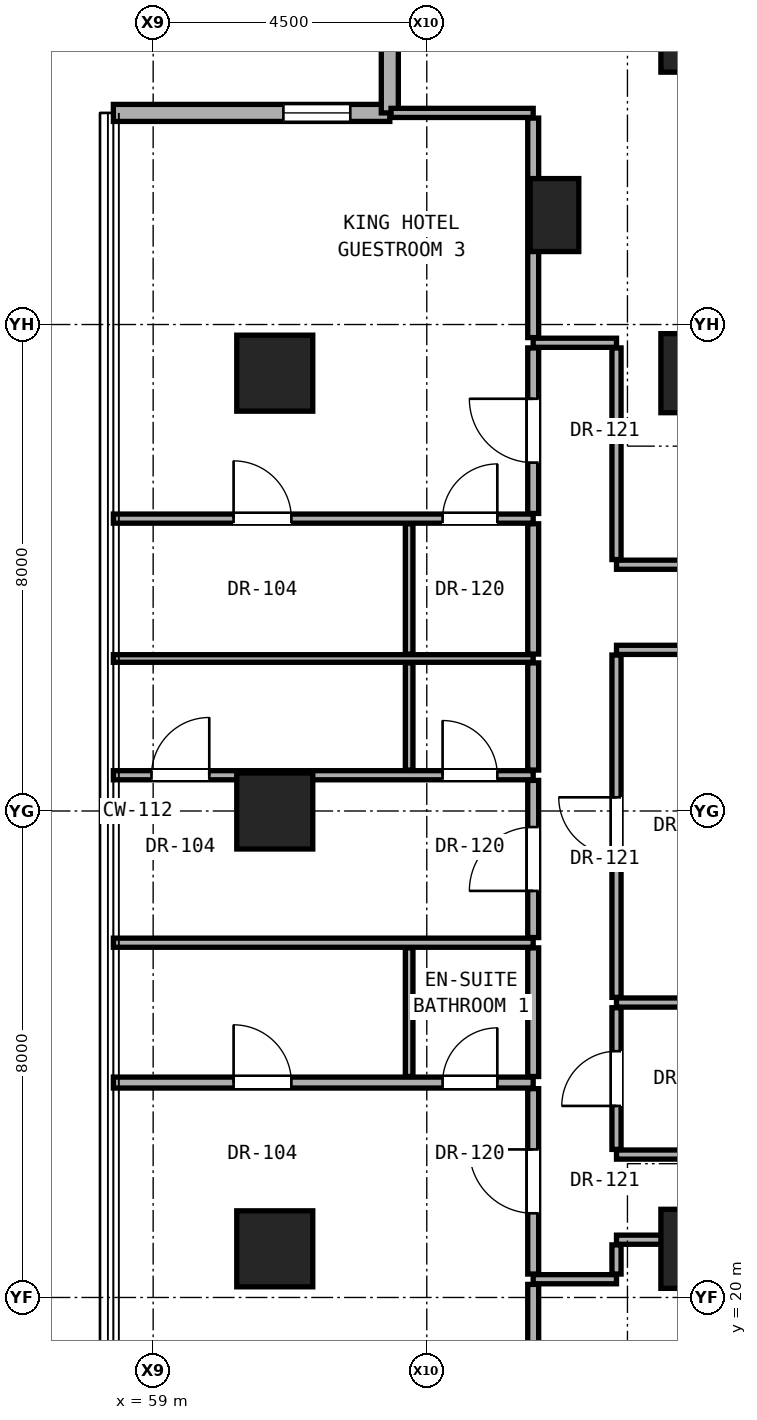
"""IFC4 building model, lengths in metres.
Left out: names, types, materials, properties, quantities, classifications, styles, units other than length and angle.
Written with IfcOpenShell. Run it as: python <this file> out.ifc"""

import sys

from ifc_helpers import new_model, si_unit, direction, frame, frame_2d, origin, origin_2d, place, context, subcontext, project, spatial, rectangle, hollow_rectangle, extrude, element, fill, save


model = new_model("IFC4")
c1 = context("Model", 3, precision=1e-05, world=origin(), true_north=direction((0.0, 1.0)))
c2 = subcontext(c1, "Body", "Model", "MODEL_VIEW")
j1 = project(units=[si_unit("LENGTHUNIT", "METRE"), si_unit("PLANEANGLEUNIT", "RADIAN")], contexts=[c1])
p1 = place(None, origin())
s1 = spatial("IfcSite", under=j1, at=p1, CompositionType="ELEMENT")
p2 = place(p1, origin())
s2 = spatial("IfcBuilding", under=s1, at=p2, CompositionType="ELEMENT")
p3 = place(p2, frame((0.0, 0.0, 62.0)))
s3 = spatial("IfcBuildingStorey", under=s2, at=p3, CompositionType="ELEMENT", Elevation=62.0)
for number, where, z_axis, x_axis in (
    (1, (68.0, 20.8, 0.0), (0.0, 0.0, 1.0), (1.0, 0.0, 0.0)),
    (2, (68.0, 35.2, 0.0), (0.0, 0.0, 1.0), (1.0, 0.0, 0.0)),
    (3, (68.0, 40.8, 0.0), (0.0, 0.0, 1.0), (1.0, 0.0, 0.0)),
):
    element("IfcColumn", number, at=place(p3, frame(where, z_axis=z_axis, x_axis=x_axis)), inside=s3, PredefinedType="COLUMN", context=c2, shape_type="SweptSolid", body=[
        extrude(rectangle(XDim=1.3, YDim=1.3, at=origin_2d()), origin(), (0.0, 0.0, 1.0), 3.3),
    ])
for number, where, z_axis, x_axis in (
    (4, (61.0, 20.8, 0.0), (0.0, 0.0, 1.0), (1.0, 0.0, 0.0)),
    (5, (61.0, 28.0, 0.0), (0.0, 0.0, 1.0), (1.0, 0.0, 0.0)),
    (6, (61.0, 35.2, 0.0), (0.0, 0.0, 1.0), (1.0, 0.0, 0.0)),
):
    element("IfcColumn", number, at=place(p3, frame(where, z_axis=z_axis, x_axis=x_axis)), inside=s3, PredefinedType="COLUMN", context=c2, shape_type="SweptSolid", body=[
        extrude(hollow_rectangle(XDim=1.25, YDim=1.25, WallThickness=0.07, at=origin_2d()), origin(), (0.0, 0.0, 1.0), 3.3),
    ])
p4 = place(p3, frame((65.6, 37.8, 0.0), z_axis=(0.0, 0.0, 1.0), x_axis=(1.0, 0.0, 0.0)))
e7 = element("IfcColumn", 7, at=p4, inside=s3, PredefinedType="PILASTER", context=c2, shape_type="SweptSolid", body=[
    extrude(rectangle(XDim=0.8, YDim=1.2, at=origin_2d()), origin(), (0.0, 0.0, 1.0), 3.3),
])
p5 = place(p3, frame((62.892, 39.48, 0.0), z_axis=(0.0, 0.0, 1.0), x_axis=(-1.0, 0.0, 0.0)))
e8 = element("IfcWall", 8, at=p5, inside=s3, PredefinedType="SOLIDWALL", context=c2, shape_type="SweptSolid", body=[
    extrude(rectangle(XDim=4.546, YDim=0.28, at=frame_2d((2.273, 0.0))), origin(), (0.0, 0.0, 1.0), 3.04),
])
p6 = place(p5, frame((0.65, 0.0, 0.85)))
e9 = element("IfcOpeningElement", 9, at=p6, cuts=e8, PredefinedType="OPENING", context=c2, shape_type="SweptSolid", body=[
    extrude(rectangle(XDim=1.1, YDim=2.0, at=frame_2d((0.55, 1.0))), frame((0.0, 0.15, 0.0), z_axis=(0.0, -1.0, 0.0), x_axis=(1.0, 0.0, 0.0)), (0.0, 0.0, 1.0), 0.3),
])
p7 = place(p3, frame((62.892, 44.026, 0.0), z_axis=(0.0, 0.0, 1.0), x_axis=(0.0, -1.0, 0.0)))
e10 = element("IfcWall", 10, at=p7, inside=s3, PredefinedType="SOLIDWALL", context=c2, shape_type="SweptSolid", body=[
    extrude(rectangle(XDim=4.546, YDim=0.28, at=frame_2d((2.273, 0.0))), origin(), (0.0, 0.0, 1.0), 3.04),
])
p8 = place(p3, frame((65.25, 20.3, 0.0), z_axis=(0.0, 0.0, 1.0), x_axis=(1.0, 0.0, 0.0)))
e11 = element("IfcWall", 11, at=p8, inside=s3, PredefinedType="PARTITIONING", context=c2, shape_type="SweptSolid", body=[
    extrude(rectangle(XDim=1.37, YDim=0.15, at=frame_2d((0.685, 0.0))), origin(), (0.0, 0.0, 1.0), 3.06),
])
p9 = place(p3, frame((66.62, 20.95, 0.0), z_axis=(0.0, 0.0, 1.0), x_axis=(1.0, 0.0, 0.0)))
e12 = element("IfcWall", 12, at=p9, inside=s3, PredefinedType="PARTITIONING", context=c2, shape_type="SweptSolid", body=[
    extrude(rectangle(XDim=1.06, YDim=0.15, at=frame_2d((0.53, 0.0))), origin(), (0.0, 0.0, 1.0), 2.452),
])
p10 = place(p3, frame((66.62, 22.35, 0.0), z_axis=(0.0, 0.0, 1.0), x_axis=(1.0, 0.0, 0.0)))
e13 = element("IfcWall", 13, at=p10, inside=s3, PredefinedType="PARTITIONING", context=c2, shape_type="SweptSolid", body=[
    extrude(rectangle(XDim=19.63, YDim=0.15, at=frame_2d((9.815, 0.0))), origin(), (0.0, 0.0, 1.0), 2.125),
])
p11 = place(p10, frame((12.085, 0.0, 0.0)))
e14 = element("IfcOpeningElement", 14, at=p11, cuts=e13, PredefinedType="OPENING", context=c2, shape_type="SweptSolid", body=[
    extrude(rectangle(XDim=0.85, YDim=2.01, at=frame_2d((0.425, 1.005))), frame((0.0, 0.085, 0.0), z_axis=(0.0, -1.0, 0.0), x_axis=(1.0, 0.0, 0.0)), (0.0, 0.0, 1.0), 0.17),
])
p12 = place(p3, frame((58.346, 23.534, 0.0), z_axis=(0.0, 0.0, 1.0), x_axis=(1.0, 0.0, 0.0)))
e15 = element("IfcWall", 15, at=p12, inside=s3, PredefinedType="PARTITIONING", context=c2, shape_type="SweptSolid", body=[
    extrude(rectangle(XDim=6.904, YDim=0.18, at=frame_2d((3.452, 0.0))), origin(), (0.0, 0.0, 1.0), 2.196),
])
p13 = place(p12, frame((1.977, 0.0, 0.0)))
e16 = element("IfcOpeningElement", 16, at=p13, cuts=e15, PredefinedType="OPENING", context=c2, shape_type="SweptSolid", body=[
    extrude(rectangle(XDim=0.95, YDim=2.15, at=frame_2d((0.475, 1.075))), frame((0.0, 0.1, 0.0), z_axis=(0.0, -1.0, 0.0), x_axis=(1.0, 0.0, 0.0)), (0.0, 0.0, 1.0), 0.2),
])
p14 = place(p12, frame((5.414, 0.0, 0.0)))
e17 = element("IfcOpeningElement", 17, at=p14, cuts=e15, PredefinedType="OPENING", context=c2, shape_type="SweptSolid", body=[
    extrude(rectangle(XDim=0.9, YDim=2.1, at=frame_2d((0.45, 1.05))), frame((0.0, 0.1, 0.0), z_axis=(0.0, -1.0, 0.0), x_axis=(1.0, 0.0, 0.0)), (0.0, 0.0, 1.0), 0.2),
])
p15 = place(p3, frame((66.62, 24.85, 0.0), z_axis=(0.0, 0.0, 1.0), x_axis=(1.0, 0.0, 0.0)))
e18 = element("IfcWall", 18, at=p15, inside=s3, PredefinedType="PARTITIONING", context=c2, shape_type="SweptSolid", body=[
    extrude(rectangle(XDim=3.13, YDim=0.15, at=frame_2d((1.565, 0.0))), origin(), (0.0, 0.0, 1.0), 2.125),
])
p16 = place(p3, frame((58.346, 25.834, 0.0), z_axis=(0.0, 0.0, 1.0), x_axis=(1.0, 0.0, 0.0)))
e19 = element("IfcWall", 19, at=p16, inside=s3, PredefinedType="PARTITIONING", context=c2, shape_type="SweptSolid", body=[
    extrude(rectangle(XDim=6.904, YDim=0.15, at=frame_2d((3.452, 0.0))), origin(), (0.0, 0.0, 1.0), 2.196),
])
p17 = place(p3, frame((58.346, 28.588, 0.0), z_axis=(0.0, 0.0, 1.0), x_axis=(1.0, 0.0, 0.0)))
e20 = element("IfcWall", 20, at=p17, inside=s3, PredefinedType="PARTITIONING", context=c2, shape_type="SweptSolid", body=[
    extrude(rectangle(XDim=6.904, YDim=0.15, at=frame_2d((3.452, 0.0))), origin(), (0.0, 0.0, 1.0), 2.196),
])
p18 = place(p17, frame((0.627, 0.0, 0.0)))
e21 = element("IfcOpeningElement", 21, at=p18, cuts=e20, PredefinedType="OPENING", context=c2, shape_type="SweptSolid", body=[
    extrude(rectangle(XDim=0.95, YDim=2.15, at=frame_2d((0.475, 1.075))), frame((0.0, 0.085, 0.0), z_axis=(0.0, -1.0, 0.0), x_axis=(1.0, 0.0, 0.0)), (0.0, 0.0, 1.0), 0.17),
])
p19 = place(p17, frame((5.414, 0.0, 0.0)))
e22 = element("IfcOpeningElement", 22, at=p19, cuts=e20, PredefinedType="OPENING", context=c2, shape_type="SweptSolid", body=[
    extrude(rectangle(XDim=0.9, YDim=2.1, at=frame_2d((0.45, 1.05))), frame((0.0, 0.085, 0.0), z_axis=(0.0, -1.0, 0.0), x_axis=(1.0, 0.0, 0.0)), (0.0, 0.0, 1.0), 0.17),
])
p20 = place(p3, frame((58.346, 30.508, 0.0), z_axis=(0.0, 0.0, 1.0), x_axis=(1.0, 0.0, 0.0)))
e23 = element("IfcWall", 23, at=p20, inside=s3, PredefinedType="PARTITIONING", context=c2, shape_type="SweptSolid", body=[
    extrude(rectangle(XDim=6.904, YDim=0.125, at=frame_2d((3.452, 0.0))), origin(), (0.0, 0.0, 1.0), 2.196),
])
p21 = place(p3, frame((66.62, 30.65, 0.0), z_axis=(0.0, 0.0, 1.0), x_axis=(1.0, 0.0, 0.0)))
e24 = element("IfcWall", 24, at=p21, inside=s3, PredefinedType="PARTITIONING", context=c2, shape_type="SweptSolid", body=[
    extrude(rectangle(XDim=19.63, YDim=0.15, at=frame_2d((9.815, 0.0))), origin(), (0.0, 0.0, 1.0), 2.125),
])
p22 = place(p21, frame((3.855, 0.0, 0.0)))
e25 = element("IfcOpeningElement", 25, at=p22, cuts=e24, PredefinedType="OPENING", context=c2, shape_type="SweptSolid", body=[
    extrude(rectangle(XDim=0.85, YDim=2.01, at=frame_2d((0.425, 1.005))), frame((0.0, 0.085, 0.0), z_axis=(0.0, -1.0, 0.0), x_axis=(1.0, 0.0, 0.0)), (0.0, 0.0, 1.0), 0.17),
])
p23 = place(p21, frame((12.085, 0.0, 0.0)))
e26 = element("IfcOpeningElement", 26, at=p23, cuts=e24, PredefinedType="OPENING", context=c2, shape_type="SweptSolid", body=[
    extrude(rectangle(XDim=0.85, YDim=2.01, at=frame_2d((0.425, 1.005))), frame((0.0, 0.085, 0.0), z_axis=(0.0, -1.0, 0.0), x_axis=(1.0, 0.0, 0.0)), (0.0, 0.0, 1.0), 0.17),
])
p24 = place(p3, frame((66.62, 32.05, 0.0), z_axis=(0.0, 0.0, 1.0), x_axis=(1.0, 0.0, 0.0)))
e27 = element("IfcWall", 27, at=p24, inside=s3, PredefinedType="PARTITIONING", context=c2, shape_type="SweptSolid", body=[
    extrude(rectangle(XDim=2.18, YDim=0.15, at=frame_2d((1.09, 0.0))), origin(), (0.0, 0.0, 1.0), 2.125),
])
p25 = place(p3, frame((58.346, 32.808, 0.0), z_axis=(0.0, 0.0, 1.0), x_axis=(1.0, 0.0, 0.0)))
e28 = element("IfcWall", 28, at=p25, inside=s3, PredefinedType="PARTITIONING", context=c2, shape_type="SweptSolid", body=[
    extrude(rectangle(XDim=6.904, YDim=0.15, at=frame_2d((3.452, 0.0))), origin(), (0.0, 0.0, 1.0), 2.196),
])
p26 = place(p25, frame((1.977, 0.0, 0.0)))
e29 = element("IfcOpeningElement", 29, at=p26, cuts=e28, PredefinedType="OPENING", context=c2, shape_type="SweptSolid", body=[
    extrude(rectangle(XDim=0.95, YDim=2.15, at=frame_2d((0.475, 1.075))), frame((0.0, 0.085, 0.0), z_axis=(0.0, -1.0, 0.0), x_axis=(1.0, 0.0, 0.0)), (0.0, 0.0, 1.0), 0.17),
])
p27 = place(p25, frame((5.414, 0.0, 0.0)))
e30 = element("IfcOpeningElement", 30, at=p27, cuts=e28, PredefinedType="OPENING", context=c2, shape_type="SweptSolid", body=[
    extrude(rectangle(XDim=0.9, YDim=2.1, at=frame_2d((0.45, 1.05))), frame((0.0, 0.085, 0.0), z_axis=(0.0, -1.0, 0.0), x_axis=(1.0, 0.0, 0.0)), (0.0, 0.0, 1.0), 0.17),
])
p28 = place(p3, frame((65.25, 35.7, 0.0), z_axis=(0.0, 0.0, 1.0), x_axis=(1.0, 0.0, 0.0)))
e31 = element("IfcWall", 31, at=p28, inside=s3, PredefinedType="PARTITIONING", context=c2, shape_type="SweptSolid", body=[
    extrude(rectangle(XDim=1.37, YDim=0.15, at=frame_2d((0.685, 0.0))), origin(), (0.0, 0.0, 1.0), 3.06),
])
p29 = place(p3, frame((62.912, 39.48, 0.0), z_axis=(0.0, 0.0, 1.0), x_axis=(1.0, 0.0, 0.0)))
e32 = element("IfcWall", 32, at=p29, inside=s3, PredefinedType="PARTITIONING", context=c2, shape_type="SweptSolid", body=[
    extrude(rectangle(XDim=2.338, YDim=0.15, at=frame_2d((1.169, 0.0))), origin(), (0.0, 0.0, 1.0), 3.06),
])
p30 = place(p3, frame((63.21, 23.634, 0.0), z_axis=(0.0, 0.0, 1.0), x_axis=(0.0, 1.0, 0.0)))
e33 = element("IfcWall", 33, at=p30, inside=s3, PredefinedType="PARTITIONING", context=c2, shape_type="SweptSolid", body=[
    extrude(rectangle(XDim=2.115, YDim=0.125, at=frame_2d((1.058, 0.0))), origin(), (0.0, 0.0, 1.0), 3.06),
])
p31 = place(p3, frame((63.21, 28.673, 0.0), z_axis=(0.0, 0.0, 1.0), x_axis=(0.0, 1.0, 0.0)))
e34 = element("IfcWall", 34, at=p31, inside=s3, PredefinedType="PARTITIONING", context=c2, shape_type="SweptSolid", body=[
    extrude(rectangle(XDim=1.762, YDim=0.125, at=frame_2d((0.881, 0.0))), origin(), (0.0, 0.0, 1.0), 3.06),
])
p32 = place(p3, frame((63.21, 30.581, 0.0), z_axis=(0.0, 0.0, 1.0), x_axis=(0.0, 1.0, 0.0)))
e35 = element("IfcWall", 35, at=p32, inside=s3, PredefinedType="PARTITIONING", context=c2, shape_type="SweptSolid", body=[
    extrude(rectangle(XDim=2.142, YDim=0.125, at=frame_2d((1.071, 0.0))), origin(), (0.0, 0.0, 1.0), 3.06),
])
p33 = place(p3, frame((65.25, 16.62, 0.0), z_axis=(0.0, 0.0, 1.0), x_axis=(0.0, 1.0, 0.0)))
e36 = element("IfcWall", 36, at=p33, inside=s3, PredefinedType="PARTITIONING", context=c2, shape_type="SweptSolid", body=[
    extrude(rectangle(XDim=3.595, YDim=0.18, at=frame_2d((1.797, 0.0))), origin(), (0.0, 0.0, 1.0), 2.436),
])
p34 = place(p3, frame((65.25, 20.385, 0.0), z_axis=(0.0, 0.0, 1.0), x_axis=(0.0, 1.0, 0.0)))
e37 = element("IfcWall", 37, at=p34, inside=s3, PredefinedType="PARTITIONING", context=c2, shape_type="SweptSolid", body=[
    extrude(rectangle(XDim=3.049, YDim=0.18, at=frame_2d((1.524, 0.0))), origin(), (0.0, 0.0, 1.0), 2.452),
])
p35 = place(p34, frame((1.0, 0.0, 0.0)))
e38 = element("IfcOpeningElement", 38, at=p35, cuts=e37, PredefinedType="OPENING", context=c2, shape_type="SweptSolid", body=[
    extrude(rectangle(XDim=1.05, YDim=2.2, at=frame_2d((0.525, 1.1))), frame((0.0, 0.1, 0.0), z_axis=(0.0, -1.0, 0.0), x_axis=(1.0, 0.0, 0.0)), (0.0, 0.0, 1.0), 0.2),
])
p36 = place(p3, frame((65.25, 23.634, 0.0), z_axis=(0.0, 0.0, 1.0), x_axis=(0.0, 1.0, 0.0)))
e39 = element("IfcWall", 39, at=p36, inside=s3, PredefinedType="PARTITIONING", context=c2, shape_type="SweptSolid", body=[
    extrude(rectangle(XDim=2.115, YDim=0.18, at=frame_2d((1.058, 0.0))), origin(), (0.0, 0.0, 1.0), 3.06),
])
p37 = place(p3, frame((65.25, 25.919, 0.0), z_axis=(0.0, 0.0, 1.0), x_axis=(0.0, 1.0, 0.0)))
e40 = element("IfcWall", 40, at=p37, inside=s3, PredefinedType="PARTITIONING", context=c2, shape_type="SweptSolid", body=[
    extrude(rectangle(XDim=2.584, YDim=0.18, at=frame_2d((1.292, 0.0))), origin(), (0.0, 0.0, 1.0), 2.279),
])
p38 = place(p37, frame((0.767, 0.0, 0.0)))
e41 = element("IfcOpeningElement", 41, at=p38, cuts=e40, PredefinedType="OPENING", context=c2, shape_type="SweptSolid", body=[
    extrude(rectangle(XDim=1.05, YDim=2.2, at=frame_2d((0.525, 1.1))), frame((0.0, 0.1, 0.0), z_axis=(0.0, -1.0, 0.0), x_axis=(1.0, 0.0, 0.0)), (0.0, 0.0, 1.0), 0.2),
])
p39 = place(p3, frame((65.25, 28.673, 0.0), z_axis=(0.0, 0.0, 1.0), x_axis=(0.0, 1.0, 0.0)))
e42 = element("IfcWall", 42, at=p39, inside=s3, PredefinedType="PARTITIONING", context=c2, shape_type="SweptSolid", body=[
    extrude(rectangle(XDim=1.762, YDim=0.18, at=frame_2d((0.881, 0.0))), origin(), (0.0, 0.0, 1.0), 3.06),
])
p40 = place(p3, frame((65.25, 30.581, 0.0), z_axis=(0.0, 0.0, 1.0), x_axis=(0.0, 1.0, 0.0)))
e43 = element("IfcWall", 43, at=p40, inside=s3, PredefinedType="PARTITIONING", context=c2, shape_type="SweptSolid", body=[
    extrude(rectangle(XDim=2.142, YDim=0.18, at=frame_2d((1.071, 0.0))), origin(), (0.0, 0.0, 1.0), 3.06),
])
p41 = place(p3, frame((65.25, 32.893, 0.0), z_axis=(0.0, 0.0, 1.0), x_axis=(0.0, 1.0, 0.0)))
e44 = element("IfcWall", 44, at=p41, inside=s3, PredefinedType="PARTITIONING", context=c2, shape_type="SweptSolid", body=[
    extrude(rectangle(XDim=2.722, YDim=0.18, at=frame_2d((1.361, 0.0))), origin(), (0.0, 0.0, 1.0), 2.452),
])
p42 = place(p41, frame((0.836, 0.0, 0.0)))
e45 = element("IfcOpeningElement", 45, at=p42, cuts=e44, PredefinedType="OPENING", context=c2, shape_type="SweptSolid", body=[
    extrude(rectangle(XDim=1.05, YDim=2.2, at=frame_2d((0.525, 1.1))), frame((0.0, 0.1, 0.0), z_axis=(0.0, -1.0, 0.0), x_axis=(1.0, 0.0, 0.0)), (0.0, 0.0, 1.0), 0.2),
])
p43 = place(p3, frame((65.25, 35.785, 0.0), z_axis=(0.0, 0.0, 1.0), x_axis=(0.0, 1.0, 0.0)))
e46 = element("IfcWall", 46, at=p43, inside=s3, PredefinedType="PARTITIONING", context=c2, shape_type="SweptSolid", body=[
    extrude(rectangle(XDim=3.61, YDim=0.18, at=frame_2d((1.805, 0.0))), origin(), (0.0, 0.0, 1.0), 2.436),
])
p44 = place(p3, frame((66.62, 20.385, 0.0), z_axis=(0.0, 0.0, 1.0), x_axis=(0.0, 1.0, 0.0)))
e47 = element("IfcWall", 47, at=p44, inside=s3, PredefinedType="PARTITIONING", context=c2, shape_type="SweptSolid", body=[
    extrude(rectangle(XDim=0.48, YDim=0.15, at=frame_2d((0.24, 0.0))), origin(), (0.0, 0.0, 1.0), 2.452),
])
p45 = place(p3, frame((66.62, 22.435, 0.0), z_axis=(0.0, 0.0, 1.0), x_axis=(0.0, 1.0, 0.0)))
e48 = element("IfcWall", 48, at=p45, inside=s3, PredefinedType="PARTITIONING", context=c2, shape_type="SweptSolid", body=[
    extrude(rectangle(XDim=2.33, YDim=0.15, at=frame_2d((1.165, 0.0))), origin(), (0.0, 0.0, 1.0), 3.06),
])
p46 = place(p45, frame((0.715, 0.0, 0.0)))
e49 = element("IfcOpeningElement", 49, at=p46, cuts=e48, PredefinedType="OPENING", context=c2, shape_type="SweptSolid", body=[
    extrude(rectangle(XDim=0.9, YDim=2.1, at=frame_2d((0.45, 1.05))), frame((0.0, 0.085, 0.0), z_axis=(0.0, -1.0, 0.0), x_axis=(1.0, 0.0, 0.0)), (0.0, 0.0, 1.0), 0.17),
])
p47 = place(p3, frame((66.62, 24.935, 0.0), z_axis=(0.0, 0.0, 1.0), x_axis=(0.0, 1.0, 0.0)))
e50 = element("IfcWall", 50, at=p47, inside=s3, PredefinedType="PARTITIONING", context=c2, shape_type="SweptSolid", body=[
    extrude(rectangle(XDim=5.63, YDim=0.15, at=frame_2d((2.815, 0.0))), origin(), (0.0, 0.0, 1.0), 2.279),
])
p48 = place(p47, frame((2.34, 0.0, 0.0)))
e51 = element("IfcOpeningElement", 51, at=p48, cuts=e50, PredefinedType="OPENING", context=c2, shape_type="SweptSolid", body=[
    extrude(rectangle(XDim=0.95, YDim=2.15, at=frame_2d((0.475, 1.075))), frame((0.0, 0.085, 0.0), z_axis=(0.0, -1.0, 0.0), x_axis=(1.0, 0.0, 0.0)), (0.0, 0.0, 1.0), 0.17),
])
p49 = place(p3, frame((66.62, 32.135, 0.0), z_axis=(0.0, 0.0, 1.0), x_axis=(0.0, 1.0, 0.0)))
e52 = element("IfcWall", 52, at=p49, inside=s3, PredefinedType="PARTITIONING", context=c2, shape_type="SweptSolid", body=[
    extrude(rectangle(XDim=3.48, YDim=0.15, at=frame_2d((1.74, 0.0))), origin(), (0.0, 0.0, 1.0), 2.452),
])
p50 = place(p6, origin())
e53 = element("IfcWindow", 53, at=p50, inside=s3, PartitioningType="SINGLE_PANEL", PredefinedType="WINDOW", context=c2, shape_type="SweptSolid", body=[
    extrude(rectangle(XDim=1.1, YDim=2.0, at=frame_2d((0.55, 1.0))), frame((0.0, 0.03, 0.0), z_axis=(0.0, -1.0, 0.0), x_axis=(1.0, 0.0, 0.0)), (0.0, 0.0, 1.0), 0.06),
])
fill(e9, e53)
p51 = place(p46, origin())
e54 = element("IfcDoor", 54, at=p51, inside=s3, OperationType="SINGLE_SWING_LEFT", PredefinedType="DOOR", context=c2, shape_type="SweptSolid", body=[
    extrude(rectangle(XDim=0.9, YDim=2.1, at=frame_2d((0.45, 1.05))), frame((0.0, 0.025, 0.0), z_axis=(0.0, -1.0, 0.0), x_axis=(1.0, 0.0, 0.0)), (0.0, 0.0, 1.0), 0.05),
])
fill(e49, e54)
p52 = place(p35, origin())
e55 = element("IfcDoor", 55, at=p52, inside=s3, OperationType="SINGLE_SWING_RIGHT", PredefinedType="DOOR", context=c2, shape_type="SweptSolid", body=[
    extrude(rectangle(XDim=1.05, YDim=2.2, at=frame_2d((0.525, 1.1))), frame((0.0, 0.025, 0.0), z_axis=(0.0, -1.0, 0.0), x_axis=(1.0, 0.0, 0.0)), (0.0, 0.0, 1.0), 0.05),
])
fill(e38, e55)
p53 = place(p13, origin())
e56 = element("IfcDoor", 56, at=p53, inside=s3, OperationType="SINGLE_SWING_LEFT", PredefinedType="DOOR", context=c2, shape_type="SweptSolid", body=[
    extrude(rectangle(XDim=0.95, YDim=2.15, at=frame_2d((0.475, 1.075))), frame((0.0, 0.025, 0.0), z_axis=(0.0, -1.0, 0.0), x_axis=(1.0, 0.0, 0.0)), (0.0, 0.0, 1.0), 0.05),
])
fill(e16, e56)
p54 = place(p14, origin())
e57 = element("IfcDoor", 57, at=p54, inside=s3, OperationType="SINGLE_SWING_RIGHT", PredefinedType="DOOR", context=c2, shape_type="SweptSolid", body=[
    extrude(rectangle(XDim=0.9, YDim=2.1, at=frame_2d((0.45, 1.05))), frame((0.0, 0.025, 0.0), z_axis=(0.0, -1.0, 0.0), x_axis=(1.0, 0.0, 0.0)), (0.0, 0.0, 1.0), 0.05),
])
fill(e17, e57)
p55 = place(p38, origin())
e58 = element("IfcDoor", 58, at=p55, inside=s3, OperationType="SINGLE_SWING_LEFT", PredefinedType="DOOR", context=c2, shape_type="SweptSolid", body=[
    extrude(rectangle(XDim=1.05, YDim=2.2, at=frame_2d((0.525, 1.1))), frame((0.0, 0.025, 0.0), z_axis=(0.0, -1.0, 0.0), x_axis=(1.0, 0.0, 0.0)), (0.0, 0.0, 1.0), 0.05),
])
fill(e41, e58)
p56 = place(p18, origin())
e59 = element("IfcDoor", 59, at=p56, inside=s3, OperationType="SINGLE_SWING_RIGHT", PredefinedType="DOOR", context=c2, shape_type="SweptSolid", body=[
    extrude(rectangle(XDim=0.95, YDim=2.15, at=frame_2d((0.475, 1.075))), frame((0.0, 0.025, 0.0), z_axis=(0.0, -1.0, 0.0), x_axis=(1.0, 0.0, 0.0)), (0.0, 0.0, 1.0), 0.05),
])
fill(e21, e59)
p57 = place(p19, origin())
e60 = element("IfcDoor", 60, at=p57, inside=s3, OperationType="SINGLE_SWING_LEFT", PredefinedType="DOOR", context=c2, shape_type="SweptSolid", body=[
    extrude(rectangle(XDim=0.9, YDim=2.1, at=frame_2d((0.45, 1.05))), frame((0.0, 0.025, 0.0), z_axis=(0.0, -1.0, 0.0), x_axis=(1.0, 0.0, 0.0)), (0.0, 0.0, 1.0), 0.05),
])
fill(e22, e60)
p58 = place(p42, origin())
e61 = element("IfcDoor", 61, at=p58, inside=s3, OperationType="SINGLE_SWING_RIGHT", PredefinedType="DOOR", context=c2, shape_type="SweptSolid", body=[
    extrude(rectangle(XDim=1.05, YDim=2.2, at=frame_2d((0.525, 1.1))), frame((0.0, 0.025, 0.0), z_axis=(0.0, -1.0, 0.0), x_axis=(1.0, 0.0, 0.0)), (0.0, 0.0, 1.0), 0.05),
])
fill(e45, e61)
p59 = place(p26, origin())
e62 = element("IfcDoor", 62, at=p59, inside=s3, OperationType="SINGLE_SWING_LEFT", PredefinedType="DOOR", context=c2, shape_type="SweptSolid", body=[
    extrude(rectangle(XDim=0.95, YDim=2.15, at=frame_2d((0.475, 1.075))), frame((0.0, 0.025, 0.0), z_axis=(0.0, -1.0, 0.0), x_axis=(1.0, 0.0, 0.0)), (0.0, 0.0, 1.0), 0.05),
])
fill(e29, e62)
p60 = place(p27, origin())
e63 = element("IfcDoor", 63, at=p60, inside=s3, OperationType="SINGLE_SWING_RIGHT", PredefinedType="DOOR", context=c2, shape_type="SweptSolid", body=[
    extrude(rectangle(XDim=0.9, YDim=2.1, at=frame_2d((0.45, 1.05))), frame((0.0, 0.025, 0.0), z_axis=(0.0, -1.0, 0.0), x_axis=(1.0, 0.0, 0.0)), (0.0, 0.0, 1.0), 0.05),
])
fill(e30, e63)
p61 = place(p48, origin())
e64 = element("IfcDoor", 64, at=p61, inside=s3, OperationType="SINGLE_SWING_RIGHT", PredefinedType="DOOR", context=c2, shape_type="SweptSolid", body=[
    extrude(rectangle(XDim=0.95, YDim=2.15, at=frame_2d((0.475, 1.075))), frame((0.0, 0.025, 0.0), z_axis=(0.0, -1.0, 0.0), x_axis=(1.0, 0.0, 0.0)), (0.0, 0.0, 1.0), 0.05),
])
fill(e51, e64)
save(model, sys.argv[1])
